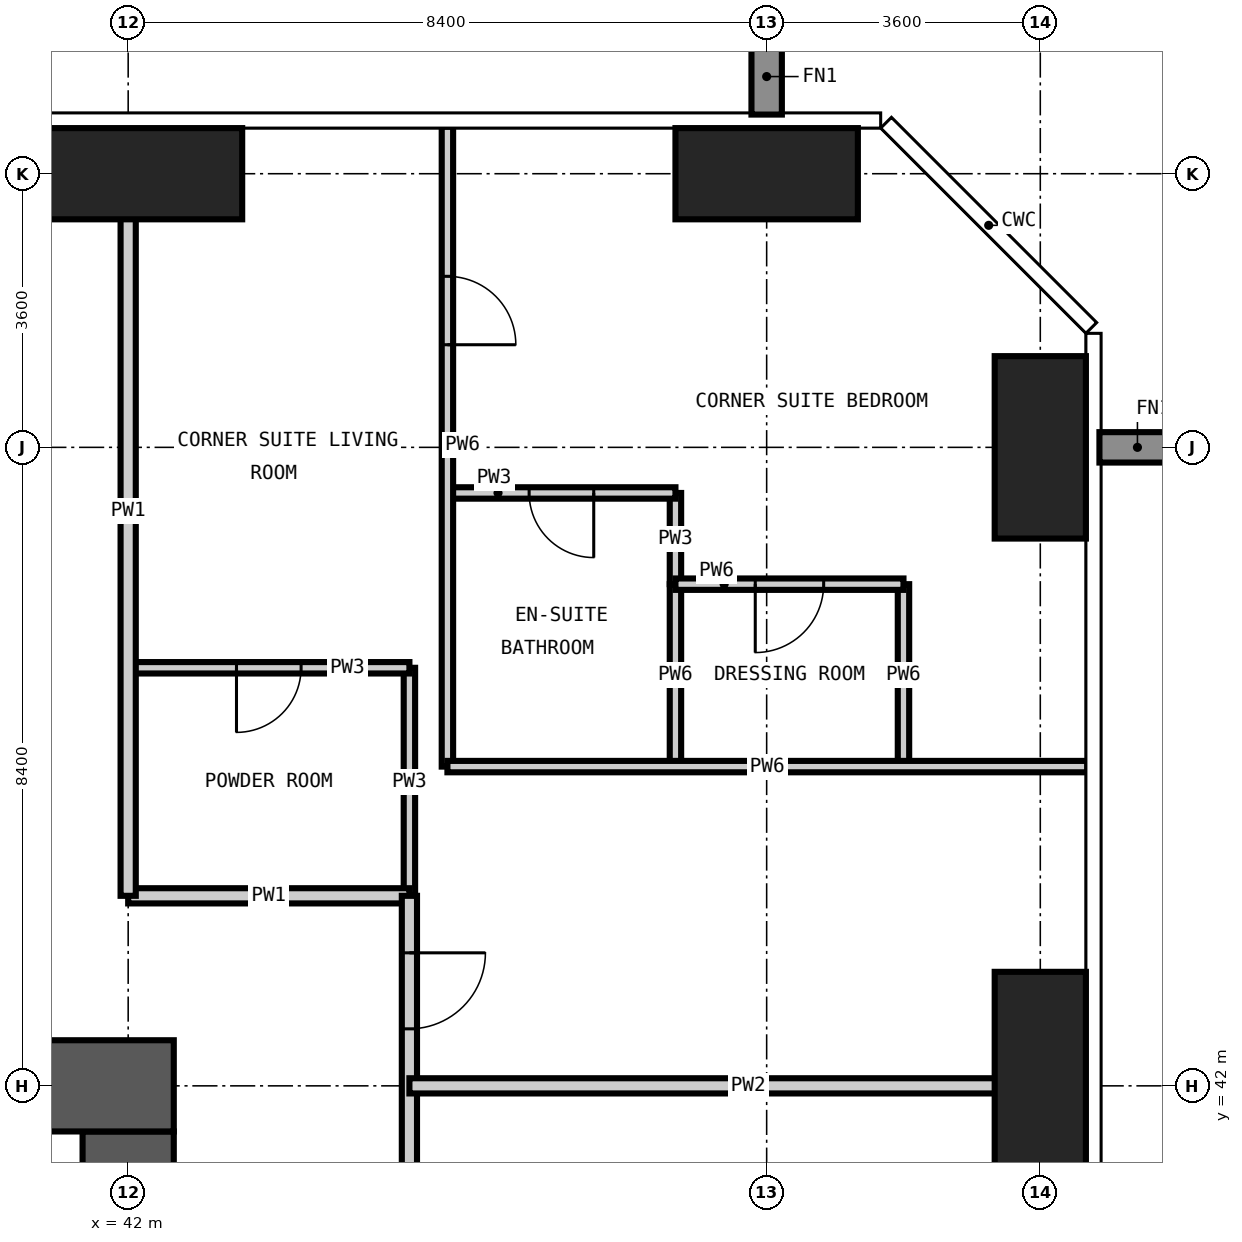
"""IFC4 building model, lengths in metres.
Left out: names, types, materials, properties, quantities, classifications, styles, units other than length and angle.
Written with IfcOpenShell. Run it as: python <this file> out.ifc"""

import sys

from ifc_helpers import new_model, si_unit, direction, frame, frame_2d, origin, origin_2d, place, context, subcontext, project, spatial, rectangle, extrude, element, fill, save


model = new_model("IFC4")
c1 = context("Model", 3, precision=1e-05, world=origin(), true_north=direction((0.0, 1.0)))
c2 = subcontext(c1, "Body", "Model", "MODEL_VIEW")
j1 = project(units=[si_unit("LENGTHUNIT", "METRE"), si_unit("PLANEANGLEUNIT", "RADIAN")], contexts=[c1])
p1 = place(None, origin())
s1 = spatial("IfcSite", under=j1, at=p1, CompositionType="ELEMENT")
p2 = place(p1, origin())
s2 = spatial("IfcBuilding", under=s1, at=p2, CompositionType="ELEMENT")
p3 = place(p2, frame((0.0, 0.0, 213.0)))
s3 = spatial("IfcBuildingStorey", under=s2, at=p3, CompositionType="ELEMENT", Elevation=213.0)
p4 = place(p3, frame((42.0, 54.0, -0.35), z_axis=(0.0, 0.0, 1.0), x_axis=(1.0, 0.0, 0.0)))
e1 = element("IfcColumn", 1, at=p4, inside=s3, PredefinedType="COLUMN", context=c2, shape_type="SweptSolid", body=[
    extrude(rectangle(XDim=3.0, YDim=1.2, at=origin_2d()), origin(), (0.0, 0.0, 1.0), 3.6),
])
p5 = place(p3, frame((50.4, 54.0, -0.35), z_axis=(0.0, 0.0, 1.0), x_axis=(1.0, 0.0, 0.0)))
e2 = element("IfcColumn", 2, at=p5, inside=s3, PredefinedType="COLUMN", context=c2, shape_type="SweptSolid", body=[
    extrude(rectangle(XDim=2.4, YDim=1.2, at=origin_2d()), origin(), (0.0, 0.0, 1.0), 3.6),
])
p6 = place(p3, frame((54.0, 42.0, -0.35), z_axis=(0.0, 0.0, 1.0), x_axis=(1.0, 0.0, 0.0)))
e3 = element("IfcColumn", 3, at=p6, inside=s3, PredefinedType="COLUMN", context=c2, shape_type="SweptSolid", body=[
    extrude(rectangle(XDim=1.2, YDim=3.0, at=origin_2d()), origin(), (0.0, 0.0, 1.0), 3.6),
])
p7 = place(p3, frame((54.0, 50.4, -0.35), z_axis=(0.0, 0.0, 1.0), x_axis=(1.0, 0.0, 0.0)))
e4 = element("IfcColumn", 4, at=p7, inside=s3, PredefinedType="COLUMN", context=c2, shape_type="SweptSolid", body=[
    extrude(rectangle(XDim=1.2, YDim=2.4, at=origin_2d()), origin(), (0.0, 0.0, 1.0), 3.6),
])
p8 = place(p3, frame((42.0, 17.4, -0.35), z_axis=(0.0, 0.0, 1.0), x_axis=(0.0, 1.0, 0.0)))
e5 = element("IfcWall", 5, at=p8, inside=s3, PredefinedType="SHEAR", context=c2, shape_type="SweptSolid", body=[
    extrude(rectangle(XDim=24.0, YDim=1.2, at=frame_2d((12.0, 0.0))), origin(), (0.0, 0.0, 1.0), 3.6),
])
p9 = place(p8, frame((0.2, 0.0, 0.35)))
e6 = element("IfcOpeningElement", 6, at=p9, cuts=e5, PredefinedType="OPENING", context=c2, shape_type="SweptSolid", body=[
    extrude(rectangle(XDim=1.2, YDim=2.2, at=frame_2d((0.6, 1.1))), frame((0.0, 0.61, 0.0), z_axis=(0.0, -1.0, 0.0), x_axis=(1.0, 0.0, 0.0)), (0.0, 0.0, 1.0), 1.22),
])
p10 = place(p8, frame((11.5, 0.0, 0.35)))
e7 = element("IfcOpeningElement", 7, at=p10, cuts=e5, PredefinedType="OPENING", context=c2, shape_type="SweptSolid", body=[
    extrude(rectangle(XDim=1.0, YDim=2.1, at=frame_2d((0.5, 1.05))), frame((0.0, 0.61, 0.0), z_axis=(0.0, -1.0, 0.0), x_axis=(1.0, 0.0, 0.0)), (0.0, 0.0, 1.0), 1.22),
])
p11 = place(p8, frame((19.9, 0.0, 0.35)))
e8 = element("IfcOpeningElement", 8, at=p11, cuts=e5, PredefinedType="OPENING", context=c2, shape_type="SweptSolid", body=[
    extrude(rectangle(XDim=1.0, YDim=2.1, at=frame_2d((0.5, 1.05))), frame((0.0, 0.61, 0.0), z_axis=(0.0, -1.0, 0.0), x_axis=(1.0, 0.0, 0.0)), (0.0, 0.0, 1.0), 1.22),
])
p12 = place(p3, frame((42.6, 42.0, -0.35), z_axis=(0.0, 0.0, 1.0), x_axis=(-1.0, 0.0, 0.0)))
e9 = element("IfcWall", 9, at=p12, inside=s3, PredefinedType="SHEAR", context=c2, shape_type="SweptSolid", body=[
    extrude(rectangle(XDim=26.4, YDim=1.2, at=frame_2d((13.2, 0.0))), origin(), (0.0, 0.0, 1.0), 3.6),
])
p13 = place(p12, frame((21.1, 0.0, 0.35)))
e10 = element("IfcOpeningElement", 10, at=p13, cuts=e9, PredefinedType="OPENING", context=c2, shape_type="SweptSolid", body=[
    extrude(rectangle(XDim=1.0, YDim=2.1, at=frame_2d((0.5, 1.05))), frame((0.0, 0.61, 0.0), z_axis=(0.0, -1.0, 0.0), x_axis=(1.0, 0.0, 0.0)), (0.0, 0.0, 1.0), 1.22),
])
p14 = place(p12, frame((10.5, 0.0, 0.35)))
e11 = element("IfcOpeningElement", 11, at=p14, cuts=e9, PredefinedType="OPENING", context=c2, shape_type="SweptSolid", body=[
    extrude(rectangle(XDim=1.2, YDim=2.2, at=frame_2d((0.6, 1.1))), frame((0.0, 0.61, 0.0), z_axis=(0.0, -1.0, 0.0), x_axis=(1.0, 0.0, 0.0)), (0.0, 0.0, 1.0), 1.22),
])
p15 = place(p3, frame((45.7, 44.5, 0.0), z_axis=(0.0, 0.0, 1.0), x_axis=(0.0, 1.0, 0.0)))
e12 = element("IfcWall", 12, at=p15, inside=s3, PredefinedType="PARTITIONING", context=c2, shape_type="SweptSolid", body=[
    extrude(rectangle(XDim=3.0, YDim=0.15, at=frame_2d((1.5, 0.0))), origin(), (0.0, 0.0, 1.0), 3.25),
])
p16 = place(p3, frame((49.2, 48.6, 0.0), z_axis=(0.0, 0.0, 1.0), x_axis=(0.0, 1.0, 0.0)))
e13 = element("IfcWall", 13, at=p16, inside=s3, PredefinedType="PARTITIONING", context=c2, shape_type="SweptSolid", body=[
    extrude(rectangle(XDim=1.2, YDim=0.15, at=frame_2d((0.6, 0.0))), origin(), (0.0, 0.0, 1.0), 3.25),
])
p17 = place(p3, frame((42.0, 47.5, 0.0), z_axis=(0.0, 0.0, 1.0), x_axis=(1.0, 0.0, 0.0)))
e14 = element("IfcWall", 14, at=p17, inside=s3, PredefinedType="PARTITIONING", context=c2, shape_type="SweptSolid", body=[
    extrude(rectangle(XDim=3.7, YDim=0.15, at=frame_2d((1.85, 0.0))), origin(), (0.0, 0.0, 1.0), 3.25),
])
p18 = place(p17, frame((1.425, 0.0, 0.0)))
e15 = element("IfcOpeningElement", 15, at=p18, cuts=e14, PredefinedType="OPENING", context=c2, shape_type="SweptSolid", body=[
    extrude(rectangle(XDim=0.85, YDim=2.1, at=frame_2d((0.425, 1.05))), frame((0.0, 0.085, 0.0), z_axis=(0.0, -1.0, 0.0), x_axis=(1.0, 0.0, 0.0)), (0.0, 0.0, 1.0), 0.17),
])
p19 = place(p3, frame((46.2, 49.8, 0.0), z_axis=(0.0, 0.0, 1.0), x_axis=(1.0, 0.0, 0.0)))
e16 = element("IfcWall", 16, at=p19, inside=s3, PredefinedType="PARTITIONING", context=c2, shape_type="SweptSolid", body=[
    extrude(rectangle(XDim=3.0, YDim=0.15, at=frame_2d((1.5, 0.0))), origin(), (0.0, 0.0, 1.0), 3.25),
])
p20 = place(p19, frame((1.075, 0.0, 0.0)))
e17 = element("IfcOpeningElement", 17, at=p20, cuts=e16, PredefinedType="OPENING", context=c2, shape_type="SweptSolid", body=[
    extrude(rectangle(XDim=0.85, YDim=2.1, at=frame_2d((0.425, 1.05))), frame((0.0, 0.085, 0.0), z_axis=(0.0, -1.0, 0.0), x_axis=(1.0, 0.0, 0.0)), (0.0, 0.0, 1.0), 0.17),
])
p21 = place(p3, frame((42.0, 44.5, 0.0), z_axis=(0.0, 0.0, 1.0), x_axis=(1.0, 0.0, 0.0)))
e18 = element("IfcWall", 18, at=p21, inside=s3, PredefinedType="PARTITIONING", context=c2, shape_type="SweptSolid", body=[
    extrude(rectangle(XDim=3.7, YDim=0.2, at=frame_2d((1.85, 0.0))), origin(), (0.0, 0.0, 1.0), 3.25),
])
p22 = place(p3, frame((42.0, 54.618, 0.0), z_axis=(0.0, 0.0, 1.0), x_axis=(0.0, -1.0, 0.0)))
e19 = element("IfcWall", 19, at=p22, inside=s3, PredefinedType="PARTITIONING", context=c2, shape_type="SweptSolid", body=[
    extrude(rectangle(XDim=10.118, YDim=0.2, at=frame_2d((5.059, 0.0))), origin(), (0.0, 0.0, 1.0), 3.25),
])
p23 = place(p3, frame((45.7, 44.5, 0.0), z_axis=(0.0, 0.0, 1.0), x_axis=(0.0, -1.0, 0.0)))
e20 = element("IfcWall", 20, at=p23, inside=s3, PredefinedType="PARTITIONING", context=c2, shape_type="SweptSolid", body=[
    extrude(rectangle(XDim=30.8, YDim=0.2, at=frame_2d((15.4, 0.0))), origin(), (0.0, 0.0, 1.0), 3.25),
])
p24 = place(p23, frame((23.0, 0.0, 0.0)))
e21 = element("IfcOpeningElement", 21, at=p24, cuts=e20, PredefinedType="OPENING", context=c2, shape_type="SweptSolid", body=[
    extrude(rectangle(XDim=1.0, YDim=2.2, at=frame_2d((0.5, 1.1))), frame((0.0, 0.11, 0.0), z_axis=(0.0, -1.0, 0.0), x_axis=(1.0, 0.0, 0.0)), (0.0, 0.0, 1.0), 0.22),
])
p25 = place(p23, frame((14.6, 0.0, 0.0)))
e22 = element("IfcOpeningElement", 22, at=p25, cuts=e20, PredefinedType="OPENING", context=c2, shape_type="SweptSolid", body=[
    extrude(rectangle(XDim=1.0, YDim=2.2, at=frame_2d((0.5, 1.1))), frame((0.0, 0.11, 0.0), z_axis=(0.0, -1.0, 0.0), x_axis=(1.0, 0.0, 0.0)), (0.0, 0.0, 1.0), 0.22),
])
p26 = place(p23, frame((6.2, 0.0, 0.0)))
e23 = element("IfcOpeningElement", 23, at=p26, cuts=e20, PredefinedType="OPENING", context=c2, shape_type="SweptSolid", body=[
    extrude(rectangle(XDim=1.0, YDim=2.2, at=frame_2d((0.5, 1.1))), frame((0.0, 0.11, 0.0), z_axis=(0.0, -1.0, 0.0), x_axis=(1.0, 0.0, 0.0)), (0.0, 0.0, 1.0), 0.22),
])
p27 = place(p23, frame((28.75, 0.0, 0.0)))
e24 = element("IfcOpeningElement", 24, at=p27, cuts=e20, PredefinedType="OPENING", context=c2, shape_type="SweptSolid", body=[
    extrude(rectangle(XDim=1.0, YDim=2.2, at=frame_2d((0.5, 1.1))), frame((0.0, 0.11, 0.0), z_axis=(0.0, -1.0, 0.0), x_axis=(1.0, 0.0, 0.0)), (0.0, 0.0, 1.0), 0.22),
])
p28 = place(p23, frame((0.75, 0.0, 0.0)))
e25 = element("IfcOpeningElement", 25, at=p28, cuts=e20, PredefinedType="OPENING", context=c2, shape_type="SweptSolid", body=[
    extrude(rectangle(XDim=1.0, YDim=2.2, at=frame_2d((0.5, 1.1))), frame((0.0, 0.11, 0.0), z_axis=(0.0, -1.0, 0.0), x_axis=(1.0, 0.0, 0.0)), (0.0, 0.0, 1.0), 0.22),
])
p29 = place(p3, frame((45.7, 42.0, 0.0), z_axis=(0.0, 0.0, 1.0), x_axis=(1.0, 0.0, 0.0)))
e26 = element("IfcWall", 26, at=p29, inside=s3, PredefinedType="PARTITIONING", context=c2, shape_type="SweptSolid", body=[
    extrude(rectangle(XDim=8.918, YDim=0.2, at=frame_2d((4.459, 0.0))), origin(), (0.0, 0.0, 1.0), 3.25),
])
p30 = place(p3, frame((46.2, 46.2, 0.0), z_axis=(0.0, 0.0, 1.0), x_axis=(0.0, 1.0, 0.0)))
e27 = element("IfcWall", 27, at=p30, inside=s3, PredefinedType="PARTITIONING", context=c2, shape_type="SweptSolid", body=[
    extrude(rectangle(XDim=8.418, YDim=0.15, at=frame_2d((4.209, 0.0))), origin(), (0.0, 0.0, 1.0), 3.25),
])
p31 = place(p30, frame((5.55, 0.0, 0.0)))
e28 = element("IfcOpeningElement", 28, at=p31, cuts=e27, PredefinedType="OPENING", context=c2, shape_type="SweptSolid", body=[
    extrude(rectangle(XDim=0.9, YDim=2.1, at=frame_2d((0.45, 1.05))), frame((0.0, 0.085, 0.0), z_axis=(0.0, -1.0, 0.0), x_axis=(1.0, 0.0, 0.0)), (0.0, 0.0, 1.0), 0.17),
])
for number, where, z_axis, x_axis in (
    (29, (49.2, 46.2, 0.0), (0.0, 0.0, 1.0), (0.0, 1.0, 0.0)),
    (30, (52.2, 46.2, 0.0), (0.0, 0.0, 1.0), (0.0, 1.0, 0.0)),
):
    element("IfcWall", number, at=place(p3, frame(where, z_axis=z_axis, x_axis=x_axis)), inside=s3, PredefinedType="PARTITIONING", context=c2, shape_type="SweptSolid", body=[
        extrude(rectangle(XDim=2.4, YDim=0.15, at=frame_2d((1.2, 0.0))), origin(), (0.0, 0.0, 1.0), 3.25),
    ])
p32 = place(p3, frame((46.2, 46.2, 0.0), z_axis=(0.0, 0.0, 1.0), x_axis=(1.0, 0.0, 0.0)))
e31 = element("IfcWall", 31, at=p32, inside=s3, PredefinedType="PARTITIONING", context=c2, shape_type="SweptSolid", body=[
    extrude(rectangle(XDim=8.418, YDim=0.15, at=frame_2d((4.209, 0.0))), origin(), (0.0, 0.0, 1.0), 3.25),
])
p33 = place(p3, frame((49.2, 48.6, 0.0), z_axis=(0.0, 0.0, 1.0), x_axis=(1.0, 0.0, 0.0)))
e32 = element("IfcWall", 32, at=p33, inside=s3, PredefinedType="PARTITIONING", context=c2, shape_type="SweptSolid", body=[
    extrude(rectangle(XDim=3.0, YDim=0.15, at=frame_2d((1.5, 0.0))), origin(), (0.0, 0.0, 1.0), 3.25),
])
p34 = place(p33, frame((1.05, 0.0, 0.0)))
e33 = element("IfcOpeningElement", 33, at=p34, cuts=e32, PredefinedType="OPENING", context=c2, shape_type="SweptSolid", body=[
    extrude(rectangle(XDim=0.9, YDim=2.1, at=frame_2d((0.45, 1.05))), frame((0.0, 0.085, 0.0), z_axis=(0.0, -1.0, 0.0), x_axis=(1.0, 0.0, 0.0)), (0.0, 0.0, 1.0), 0.17),
])
p35 = place(p28, origin())
e34 = element("IfcDoor", 34, at=p35, inside=s3, OperationType="SINGLE_SWING_LEFT", PredefinedType="DOOR", context=c2, shape_type="SweptSolid", body=[
    extrude(rectangle(XDim=1.0, YDim=2.2, at=frame_2d((0.5, 1.1))), frame((0.0, 0.025, 0.0), z_axis=(0.0, -1.0, 0.0), x_axis=(1.0, 0.0, 0.0)), (0.0, 0.0, 1.0), 0.05),
])
fill(e25, e34)
p36 = place(p18, frame((0.85, 0.0, 0.0), z_axis=(0.0, 0.0, 1.0), x_axis=(-1.0, 0.0, 0.0)))
e35 = element("IfcDoor", 35, at=p36, inside=s3, OperationType="SINGLE_SWING_RIGHT", PredefinedType="DOOR", context=c2, shape_type="SweptSolid", body=[
    extrude(rectangle(XDim=0.85, YDim=2.1, at=frame_2d((0.425, 1.05))), frame((0.0, 0.025, 0.0), z_axis=(0.0, -1.0, 0.0), x_axis=(1.0, 0.0, 0.0)), (0.0, 0.0, 1.0), 0.05),
])
fill(e15, e35)
p37 = place(p31, frame((0.9, 0.0, 0.0), z_axis=(0.0, 0.0, 1.0), x_axis=(-1.0, 0.0, 0.0)))
e36 = element("IfcDoor", 36, at=p37, inside=s3, OperationType="SINGLE_SWING_RIGHT", PredefinedType="DOOR", context=c2, shape_type="SweptSolid", body=[
    extrude(rectangle(XDim=0.9, YDim=2.1, at=frame_2d((0.45, 1.05))), frame((0.0, 0.025, 0.0), z_axis=(0.0, -1.0, 0.0), x_axis=(1.0, 0.0, 0.0)), (0.0, 0.0, 1.0), 0.05),
])
fill(e28, e36)
p38 = place(p20, frame((0.85, 0.0, 0.0), z_axis=(0.0, 0.0, 1.0), x_axis=(-1.0, 0.0, 0.0)))
e37 = element("IfcDoor", 37, at=p38, inside=s3, OperationType="SINGLE_SWING_LEFT", PredefinedType="DOOR", context=c2, shape_type="SweptSolid", body=[
    extrude(rectangle(XDim=0.85, YDim=2.1, at=frame_2d((0.425, 1.05))), frame((0.0, 0.025, 0.0), z_axis=(0.0, -1.0, 0.0), x_axis=(1.0, 0.0, 0.0)), (0.0, 0.0, 1.0), 0.05),
])
fill(e17, e37)
p39 = place(p34, frame((0.9, 0.0, 0.0), z_axis=(0.0, 0.0, 1.0), x_axis=(-1.0, 0.0, 0.0)))
e38 = element("IfcDoor", 38, at=p39, inside=s3, OperationType="SINGLE_SWING_RIGHT", PredefinedType="DOOR", context=c2, shape_type="SweptSolid", body=[
    extrude(rectangle(XDim=0.9, YDim=2.1, at=frame_2d((0.45, 1.05))), frame((0.0, 0.025, 0.0), z_axis=(0.0, -1.0, 0.0), x_axis=(1.0, 0.0, 0.0)), (0.0, 0.0, 1.0), 0.05),
])
fill(e33, e38)
save(model, sys.argv[1])
